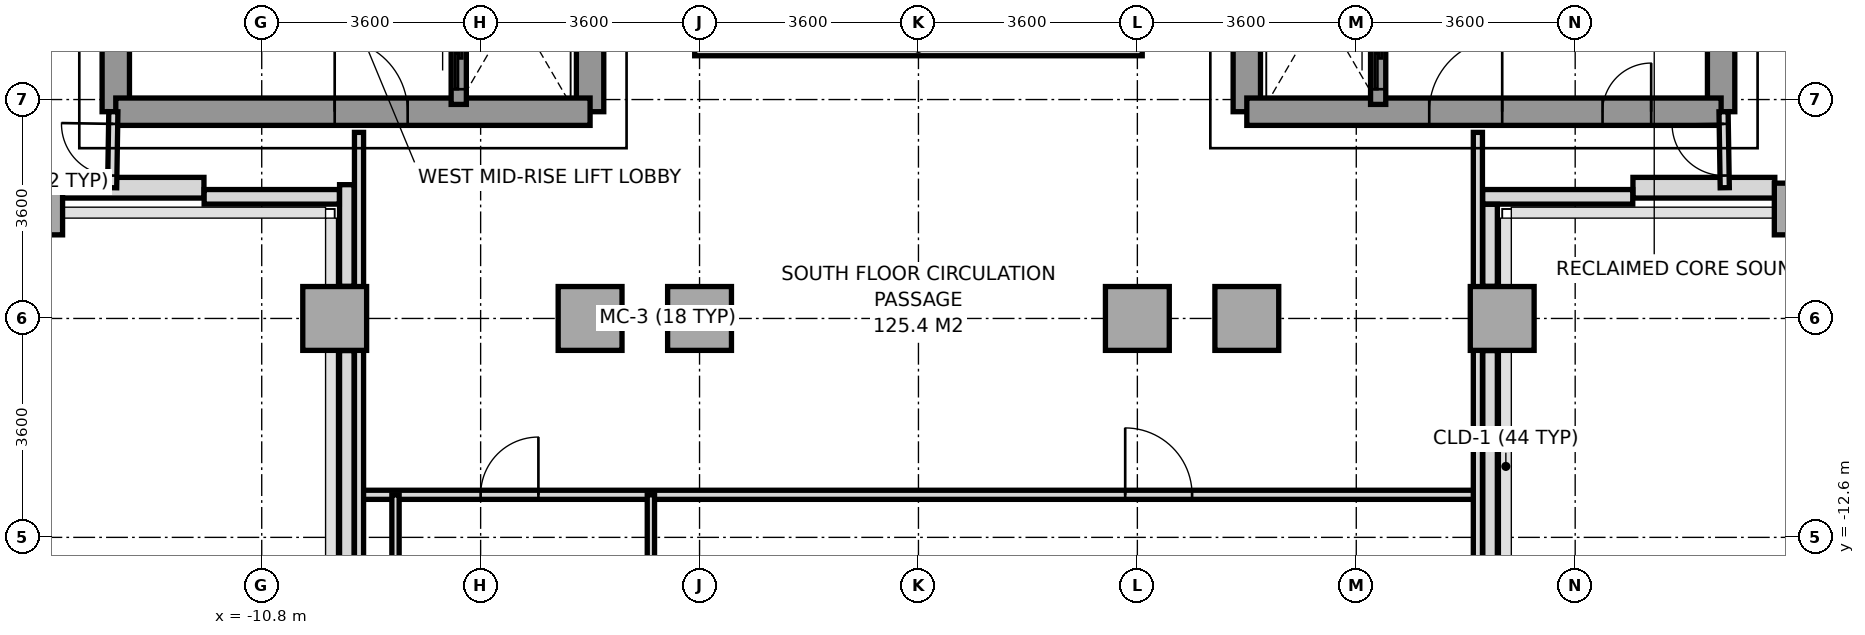
"""IFC4 building model, lengths in metres.
Left out: names, types, materials, properties, quantities, classifications, styles, units other than length and angle.
Written with IfcOpenShell. Run it as: python <this file> out.ifc"""

import sys

from ifc_helpers import new_model, si_unit, direction, frame, frame_2d, origin, origin_2d, place, context, subcontext, project, spatial, rectangle, extrude, source, transform, mapped, element, fill, save


model = new_model("IFC4")
c1 = context("Model", 3, precision=1e-05, world=origin(), true_north=direction((0.0, 1.0)))
c2 = subcontext(c1, "Body", "Model", "MODEL_VIEW")
j1 = project(units=[si_unit("LENGTHUNIT", "METRE"), si_unit("PLANEANGLEUNIT", "RADIAN")], contexts=[c1])
p1 = place(None, origin())
s1 = spatial("IfcSite", under=j1, at=p1, CompositionType="ELEMENT")
p2 = place(p1, origin())
s2 = spatial("IfcBuilding", under=s1, at=p2, CompositionType="ELEMENT")
p3 = place(p2, frame((0.0, 0.0, 138.0)))
s3 = spatial("IfcBuildingStorey", under=s2, at=p3, CompositionType="ELEMENT", Elevation=138.0)
m1 = source(origin(), c2, "Body", "SweptSolid", [
    extrude(rectangle(XDim=0.65, YDim=0.85, at=origin_2d()), origin(), (0.0, 0.0, 1.0), 3.2),
])
p4 = place(p3, frame((-14.4, -7.2, 0.0), z_axis=(0.0, 0.0, 1.0), x_axis=(1.0, 0.0, 0.0)))
e1 = element("IfcColumn", 1, at=p4, inside=s3, PredefinedType="COLUMN", context=c2, shape_type="MappedRepresentation", body=[
    mapped(m1, transform((0.0, 0.0, 0.0), x_axis=(1.0, 0.0, 0.0), y_axis=(0.0, 1.0, 0.0), z_axis=(0.0, 0.0, 1.0), scale=1.0)),
])
m2 = source(origin(), c2, "Body", "SweptSolid", [
    extrude(rectangle(XDim=1.05, YDim=1.05, at=origin_2d()), origin(), (0.0, 0.0, 1.0), 3.2),
])
for number, where, z_axis, x_axis in (
    (2, (-9.6, -9.0, 0.0), (0.0, 0.0, 1.0), (1.0, 0.0, 0.0)),
    (3, (-5.4, -9.0, 0.0), (0.0, 0.0, 1.0), (1.0, 0.0, 0.0)),
    (4, (-3.6, -9.0, 0.0), (0.0, 0.0, 1.0), (1.0, 0.0, 0.0)),
    (5, (3.6, -9.0, 0.0), (0.0, 0.0, 1.0), (1.0, 0.0, 0.0)),
    (6, (5.4, -9.0, 0.0), (0.0, 0.0, 1.0), (1.0, 0.0, 0.0)),
    (7, (9.6, -9.0, 0.0), (0.0, 0.0, 1.0), (1.0, 0.0, 0.0)),
):
    element("IfcColumn", number, at=place(p3, frame(where, z_axis=z_axis, x_axis=x_axis)), inside=s3, PredefinedType="COLUMN", context=c2, shape_type="MappedRepresentation", body=[
        mapped(m2, transform((0.0, 0.0, 0.0), x_axis=(1.0, 0.0, 0.0), y_axis=(0.0, 1.0, 0.0), z_axis=(0.0, 0.0, 1.0), scale=1.0)),
    ])
p5 = place(p3, frame((14.4, -7.2, 0.0), z_axis=(0.0, 0.0, 1.0), x_axis=(1.0, 0.0, 0.0)))
e8 = element("IfcColumn", 8, at=p5, inside=s3, PredefinedType="COLUMN", context=c2, shape_type="MappedRepresentation", body=[
    mapped(m1, transform((0.0, 0.0, 0.0), x_axis=(1.0, 0.0, 0.0), y_axis=(0.0, 1.0, 0.0), z_axis=(0.0, 0.0, 1.0), scale=1.0)),
])
for number, where, z_axis, x_axis in (
    (9, (-14.083, -6.85, 0.0), (0.0, 0.0, 1.0), (1.0, 0.0, 0.0)),
    (10, (11.75, -6.85, 0.0), (0.0, 0.0, 1.0), (1.0, 0.0, 0.0)),
):
    element("IfcWall", number, at=place(p3, frame(where, z_axis=z_axis, x_axis=x_axis)), inside=s3, PredefinedType="SOLIDWALL", context=c2, shape_type="SweptSolid", body=[
        extrude(rectangle(XDim=2.333, YDim=0.34, at=frame_2d((1.167, 0.0))), origin(), (0.0, 0.0, 1.0), 3.2),
    ])
p6 = place(p3, frame((11.747, -7.0, 0.0), z_axis=(0.0, 0.0, 1.0), x_axis=(-1.0, 0.0, 0.0)))
e11 = element("IfcWall", 11, at=p6, inside=s3, PredefinedType="PARAPET", context=c2, shape_type="SweptSolid", body=[
    extrude(rectangle(XDim=2.469, YDim=0.24, at=frame_2d((1.234, 0.0))), origin(), (0.0, 0.0, 1.0), 1.15),
])
p7 = place(p3, frame((9.4, -7.123, 0.0), z_axis=(0.0, 0.0, 1.0), x_axis=(0.0, -1.0, 0.0)))
e12 = element("IfcWall", 12, at=p7, inside=s3, PredefinedType="PARAPET", context=c2, shape_type="SweptSolid", body=[
    extrude(rectangle(XDim=1.349, YDim=0.24, at=frame_2d((0.674, 0.0))), origin(), (0.0, 0.0, 1.0), 1.15),
])
p8 = place(p3, frame((9.4, -9.528, 0.0), z_axis=(0.0, 0.0, 1.0), x_axis=(0.0, -1.0, 0.0)))
e13 = element("IfcWall", 13, at=p8, inside=s3, PredefinedType="PARAPET", context=c2, shape_type="SweptSolid", body=[
    extrude(rectangle(XDim=6.075, YDim=0.24, at=frame_2d((3.037, 0.0))), origin(), (0.0, 0.0, 1.0), 1.15),
])
p9 = place(p3, frame((-9.4, -15.358, 0.0), z_axis=(0.0, 0.0, 1.0), x_axis=(0.0, 1.0, 0.0)))
e14 = element("IfcWall", 14, at=p9, inside=s3, PredefinedType="PARAPET", context=c2, shape_type="SweptSolid", body=[
    extrude(rectangle(XDim=5.83, YDim=0.24, at=frame_2d((2.915, 0.0))), origin(), (0.0, 0.0, 1.0), 1.15),
])
p10 = place(p3, frame((-9.4, -8.472, 0.0), z_axis=(0.0, 0.0, 1.0), x_axis=(0.0, 1.0, 0.0)))
e15 = element("IfcWall", 15, at=p10, inside=s3, PredefinedType="PARAPET", context=c2, shape_type="SweptSolid", body=[
    extrude(rectangle(XDim=1.672, YDim=0.24, at=frame_2d((0.836, 0.0))), origin(), (0.0, 0.0, 1.0), 1.15),
])
p11 = place(p3, frame((-9.523, -7.0, 0.0), z_axis=(0.0, 0.0, 1.0), x_axis=(-1.0, 0.0, 0.0)))
e16 = element("IfcWall", 16, at=p11, inside=s3, PredefinedType="PARAPET", context=c2, shape_type="SweptSolid", body=[
    extrude(rectangle(XDim=2.224, YDim=0.24, at=frame_2d((1.112, 0.0))), origin(), (0.0, 0.0, 1.0), 1.15),
])
p12 = place(p3, frame((-13.2, -5.6, 0.0), z_axis=(0.0, 0.0, 1.0), x_axis=(0.0, 1.0, 0.0)))
e17 = element("IfcWall", 17, at=p12, inside=s3, PredefinedType="SHEAR", context=c2, shape_type="SweptSolid", body=[
    extrude(rectangle(XDim=11.2, YDim=0.45, at=frame_2d((5.6, 0.0))), origin(), (0.0, 0.0, 1.0), 3.2),
])
p13 = place(p3, frame((-5.4, -5.6, 0.0), z_axis=(0.0, 0.0, 1.0), x_axis=(0.0, 1.0, 0.0)))
e18 = element("IfcWall", 18, at=p13, inside=s3, PredefinedType="SHEAR", context=c2, shape_type="SweptSolid", body=[
    extrude(rectangle(XDim=12.5, YDim=0.45, at=frame_2d((6.25, 0.0))), origin(), (0.0, 0.0, 1.0), 3.2),
])
p14 = place(p13, frame((4.55, 0.0, 0.0)))
e19 = element("IfcOpeningElement", 19, at=p14, cuts=e18, PredefinedType="OPENING", context=c2, shape_type="SweptSolid", body=[
    extrude(rectangle(XDim=1.2, YDim=2.2, at=frame_2d((0.6, 1.1))), frame((0.0, 0.235, 0.0), z_axis=(0.0, -1.0, 0.0), x_axis=(1.0, 0.0, 0.0)), (0.0, 0.0, 1.0), 0.47),
])
p15 = place(p3, frame((-13.2, -5.6, 0.0), z_axis=(0.0, 0.0, 1.0), x_axis=(1.0, 0.0, 0.0)))
e20 = element("IfcWall", 20, at=p15, inside=s3, PredefinedType="SHEAR", context=c2, shape_type="SweptSolid", body=[
    extrude(rectangle(XDim=7.8, YDim=0.45, at=frame_2d((3.9, 0.0))), origin(), (0.0, 0.0, 1.0), 3.2),
])
p16 = place(p15, frame((3.6, 0.0, 0.0)))
e21 = element("IfcOpeningElement", 21, at=p16, cuts=e20, PredefinedType="OPENING", context=c2, shape_type="SweptSolid", body=[
    extrude(rectangle(XDim=1.2, YDim=2.2, at=frame_2d((0.6, 1.1))), frame((0.0, 0.235, 0.0), z_axis=(0.0, -1.0, 0.0), x_axis=(1.0, 0.0, 0.0)), (0.0, 0.0, 1.0), 0.47),
])
p17 = place(p3, frame((13.2, -5.6, 0.0), z_axis=(0.0, 0.0, 1.0), x_axis=(0.0, 1.0, 0.0)))
e22 = element("IfcWall", 22, at=p17, inside=s3, PredefinedType="SHEAR", context=c2, shape_type="SweptSolid", body=[
    extrude(rectangle(XDim=11.2, YDim=0.45, at=frame_2d((5.6, 0.0))), origin(), (0.0, 0.0, 1.0), 3.2),
])
p18 = place(p3, frame((5.4, -5.6, 0.0), z_axis=(0.0, 0.0, 1.0), x_axis=(0.0, 1.0, 0.0)))
e23 = element("IfcWall", 23, at=p18, inside=s3, PredefinedType="SHEAR", context=c2, shape_type="SweptSolid", body=[
    extrude(rectangle(XDim=12.5, YDim=0.45, at=frame_2d((6.25, 0.0))), origin(), (0.0, 0.0, 1.0), 3.2),
])
p19 = place(p18, frame((4.55, 0.0, 0.0)))
e24 = element("IfcOpeningElement", 24, at=p19, cuts=e23, PredefinedType="OPENING", context=c2, shape_type="SweptSolid", body=[
    extrude(rectangle(XDim=1.2, YDim=2.2, at=frame_2d((0.6, 1.1))), frame((0.0, 0.235, 0.0), z_axis=(0.0, -1.0, 0.0), x_axis=(1.0, 0.0, 0.0)), (0.0, 0.0, 1.0), 0.47),
])
p20 = place(p18, frame((7.88, 0.0, 0.0)))
e25 = element("IfcOpeningElement", 25, at=p20, cuts=e23, PredefinedType="OPENING", context=c2, shape_type="SweptSolid", body=[
    extrude(rectangle(XDim=0.8, YDim=2.1, at=frame_2d((0.4, 1.05))), frame((0.0, 0.235, 0.0), z_axis=(0.0, -1.0, 0.0), x_axis=(1.0, 0.0, 0.0)), (0.0, 0.0, 1.0), 0.47),
])
p21 = place(p3, frame((5.4, -5.6, 0.0), z_axis=(0.0, 0.0, 1.0), x_axis=(1.0, 0.0, 0.0)))
e26 = element("IfcWall", 26, at=p21, inside=s3, PredefinedType="SHEAR", context=c2, shape_type="SweptSolid", body=[
    extrude(rectangle(XDim=7.8, YDim=0.45, at=frame_2d((3.9, 0.0))), origin(), (0.0, 0.0, 1.0), 3.2),
])
p22 = place(p21, frame((3.0, 0.0, 0.0)))
e27 = element("IfcOpeningElement", 27, at=p22, cuts=e26, PredefinedType="OPENING", context=c2, shape_type="SweptSolid", body=[
    extrude(rectangle(XDim=1.2, YDim=2.2, at=frame_2d((0.6, 1.1))), frame((0.0, 0.235, 0.0), z_axis=(0.0, -1.0, 0.0), x_axis=(1.0, 0.0, 0.0)), (0.0, 0.0, 1.0), 0.47),
])
p23 = place(p21, frame((5.85, 0.0, 0.0)))
e28 = element("IfcOpeningElement", 28, at=p23, cuts=e26, PredefinedType="OPENING", context=c2, shape_type="SweptSolid", body=[
    extrude(rectangle(XDim=0.8, YDim=2.1, at=frame_2d((0.4, 1.05))), frame((0.0, 0.235, 0.0), z_axis=(0.0, -1.0, 0.0), x_axis=(1.0, 0.0, 0.0)), (0.0, 0.0, 1.0), 0.47),
])
p24 = place(p3, frame((-7.56, -5.48, 0.0), z_axis=(0.0, 0.0, 1.0), x_axis=(0.0, 1.0, 0.0)))
e29 = element("IfcWall", 29, at=p24, inside=s3, PredefinedType="SOLIDWALL", context=c2, shape_type="SweptSolid", body=[
    extrude(rectangle(XDim=1.6, YDim=0.25, at=frame_2d((0.8, 0.0))), origin(), (0.0, 0.0, 1.0), 3.2),
])
p25 = place(p24, frame((0.25, 0.0, 0.0)))
e30 = element("IfcOpeningElement", 30, at=p25, cuts=e29, PredefinedType="OPENING", context=c2, shape_type="SweptSolid", body=[
    extrude(rectangle(XDim=1.1, YDim=2.2, at=frame_2d((0.55, 1.1))), frame((0.0, 0.135, 0.0), z_axis=(0.0, -1.0, 0.0), x_axis=(1.0, 0.0, 0.0)), (0.0, 0.0, 1.0), 0.27),
])
p26 = place(p3, frame((7.56, -5.48, 0.0), z_axis=(0.0, 0.0, 1.0), x_axis=(0.0, 1.0, 0.0)))
e31 = element("IfcWall", 31, at=p26, inside=s3, PredefinedType="SOLIDWALL", context=c2, shape_type="SweptSolid", body=[
    extrude(rectangle(XDim=1.6, YDim=0.25, at=frame_2d((0.8, 0.0))), origin(), (0.0, 0.0, 1.0), 3.2),
])
p27 = place(p26, frame((0.25, 0.0, 0.0)))
e32 = element("IfcOpeningElement", 32, at=p27, cuts=e31, PredefinedType="OPENING", context=c2, shape_type="SweptSolid", body=[
    extrude(rectangle(XDim=1.1, YDim=2.2, at=frame_2d((0.55, 1.1))), frame((0.0, 0.135, 0.0), z_axis=(0.0, -1.0, 0.0), x_axis=(1.0, 0.0, 0.0)), (0.0, 0.0, 1.0), 0.27),
])
p28 = place(p3, frame((-9.2, -11.9, 0.0), z_axis=(0.0, 0.0, 1.0), x_axis=(1.0, 0.0, 0.0)))
e33 = element("IfcWall", 33, at=p28, inside=s3, PredefinedType="PARTITIONING", context=c2, shape_type="SweptSolid", body=[
    extrude(rectangle(XDim=18.4, YDim=0.15, at=frame_2d((9.2, 0.0))), origin(), (0.0, 0.0, 1.0), 3.2),
])
p29 = place(p28, frame((2.0, 0.0, 0.0)))
e34 = element("IfcOpeningElement", 34, at=p29, cuts=e33, PredefinedType="OPENING", context=c2, shape_type="SweptSolid", body=[
    extrude(rectangle(XDim=0.95, YDim=2.15, at=frame_2d((0.475, 1.075))), frame((0.0, 0.085, 0.0), z_axis=(0.0, -1.0, 0.0), x_axis=(1.0, 0.0, 0.0)), (0.0, 0.0, 1.0), 0.17),
])
p30 = place(p28, frame((12.6, 0.0, 0.0)))
e35 = element("IfcOpeningElement", 35, at=p30, cuts=e33, PredefinedType="OPENING", context=c2, shape_type="SweptSolid", body=[
    extrude(rectangle(XDim=1.1, YDim=2.2, at=frame_2d((0.55, 1.1))), frame((0.0, 0.085, 0.0), z_axis=(0.0, -1.0, 0.0), x_axis=(1.0, 0.0, 0.0)), (0.0, 0.0, 1.0), 0.17),
])
for number, where, z_axis, x_axis in (
    (36, (-9.2, -15.68, 0.0), (0.0, 0.0, 1.0), (0.0, 1.0, 0.0)),
    (37, (9.2, -15.68, 0.0), (0.0, 0.0, 1.0), (0.0, 1.0, 0.0)),
):
    element("IfcWall", number, at=place(p3, frame(where, z_axis=z_axis, x_axis=x_axis)), inside=s3, PredefinedType="PARTITIONING", context=c2, shape_type="SweptSolid", body=[
        extrude(rectangle(XDim=9.74, YDim=0.15, at=frame_2d((4.87, 0.0))), origin(), (0.0, 0.0, 1.0), 2.7),
    ])
p31 = place(p3, frame((-8.6, -15.5, 0.0), z_axis=(0.0, 0.0, 1.0), x_axis=(0.0, 1.0, 0.0)))
e38 = element("IfcWall", 38, at=p31, inside=s3, PredefinedType="PARTITIONING", context=c2, shape_type="SweptSolid", body=[
    extrude(rectangle(XDim=3.6, YDim=0.12, at=frame_2d((1.8, 0.0))), origin(), (0.0, 0.0, 1.0), 3.2),
])
p32 = place(p3, frame((-4.4, -15.5, 0.0), z_axis=(0.0, 0.0, 1.0), x_axis=(0.0, 1.0, 0.0)))
e39 = element("IfcWall", 39, at=p32, inside=s3, PredefinedType="PARTITIONING", context=c2, shape_type="SweptSolid", body=[
    extrude(rectangle(XDim=3.6, YDim=0.12, at=frame_2d((1.8, 0.0))), origin(), (0.0, 0.0, 1.0), 2.7),
])
p33 = place(p3, frame((-13.26, -6.85, 0.0), z_axis=(0.0, 0.0, 1.0), x_axis=(0.016013571389, 0.999871774545, 0.0)))
e40 = element("IfcWall", 40, at=p33, inside=s3, PredefinedType="PARTITIONING", context=c2, shape_type="SweptSolid", body=[
    extrude(rectangle(XDim=1.25, YDim=0.15, at=frame_2d((0.625, 0.0))), origin(), (0.0, 0.0, 1.0), 3.2),
])
p34 = place(p33, frame((0.2, 0.0, 0.0)))
e41 = element("IfcOpeningElement", 41, at=p34, cuts=e40, PredefinedType="OPENING", context=c2, shape_type="SweptSolid", body=[
    extrude(rectangle(XDim=0.85, YDim=2.1, at=frame_2d((0.425, 1.05))), frame((0.0, 0.085, 0.0), z_axis=(0.0, -1.0, 0.0), x_axis=(1.0, 0.0, 0.0)), (0.0, 0.0, 1.0), 0.17),
])
p35 = place(p3, frame((13.26, -6.85, 0.0), z_axis=(0.0, 0.0, 1.0), x_axis=(-0.016013571389, 0.999871774545, 0.0)))
e42 = element("IfcWall", 42, at=p35, inside=s3, PredefinedType="PARTITIONING", context=c2, shape_type="SweptSolid", body=[
    extrude(rectangle(XDim=1.25, YDim=0.15, at=frame_2d((0.625, 0.0))), origin(), (0.0, 0.0, 1.0), 3.2),
])
p36 = place(p35, frame((0.2, 0.0, 0.0)))
e43 = element("IfcOpeningElement", 43, at=p36, cuts=e42, PredefinedType="OPENING", context=c2, shape_type="SweptSolid", body=[
    extrude(rectangle(XDim=0.85, YDim=2.1, at=frame_2d((0.425, 1.05))), frame((0.0, 0.085, 0.0), z_axis=(0.0, -1.0, 0.0), x_axis=(1.0, 0.0, 0.0)), (0.0, 0.0, 1.0), 0.17),
])
p37 = place(p3, frame((-3.68, -4.56, 0.0), z_axis=(0.0, 0.0, 1.0), x_axis=(1.0, 0.0, 0.0)))
e44 = element("IfcWall", 44, at=p37, inside=s3, PredefinedType="PARAPET", context=c2, shape_type="SweptSolid", body=[
    extrude(rectangle(XDim=7.36, YDim=0.24, at=frame_2d((3.68, 0.0))), origin(), (0.0, 0.0, 1.0), 1.15),
])
m3 = source(origin(), c2, "Body", "SweptSolid", [
    extrude(rectangle(XDim=1.2, YDim=2.2, at=frame_2d((0.6, 1.1))), frame((0.0, 0.025, 0.0), z_axis=(0.0, -1.0, 0.0), x_axis=(1.0, 0.0, 0.0)), (0.0, 0.0, 1.0), 0.05),
])
p38 = place(p16, origin())
e45 = element("IfcDoor", 45, at=p38, inside=s3, OperationType="SINGLE_SWING_LEFT", PredefinedType="DOOR", context=c2, shape_type="MappedRepresentation", body=[
    mapped(m3, transform((0.0, 0.0, 0.0), x_axis=(1.0, 0.0, 0.0), y_axis=(0.0, 1.0, 0.0), z_axis=(0.0, 0.0, 1.0), scale=1.0)),
])
fill(e21, e45)
p39 = place(p22, origin())
e46 = element("IfcDoor", 46, at=p39, inside=s3, OperationType="SINGLE_SWING_RIGHT", PredefinedType="DOOR", context=c2, shape_type="MappedRepresentation", body=[
    mapped(m3, transform((0.0, 0.0, 0.0), x_axis=(1.0, 0.0, 0.0), y_axis=(0.0, 1.0, 0.0), z_axis=(0.0, 0.0, 1.0), scale=1.0)),
])
fill(e27, e46)
m4 = source(origin(), c2, "Body", "SweptSolid", [
    extrude(rectangle(XDim=0.8, YDim=2.1, at=frame_2d((0.4, 1.05))), frame((0.0, 0.025, 0.0), z_axis=(0.0, -1.0, 0.0), x_axis=(1.0, 0.0, 0.0)), (0.0, 0.0, 1.0), 0.05),
])
p40 = place(p23, origin())
e47 = element("IfcDoor", 47, at=p40, inside=s3, OperationType="SINGLE_SWING_RIGHT", PredefinedType="DOOR", context=c2, shape_type="MappedRepresentation", body=[
    mapped(m4, transform((0.0, 0.0, 0.0), x_axis=(1.0, 0.0, 0.0), y_axis=(0.0, 1.0, 0.0), z_axis=(0.0, 0.0, 1.0), scale=1.0)),
])
fill(e28, e47)
m5 = source(origin(), c2, "Body", "SweptSolid", [
    extrude(rectangle(XDim=1.1, YDim=2.2, at=frame_2d((0.55, 1.1))), frame((0.0, 0.025, 0.0), z_axis=(0.0, -1.0, 0.0), x_axis=(1.0, 0.0, 0.0)), (0.0, 0.0, 1.0), 0.05),
])
p41 = place(p25, origin())
e48 = element("IfcDoor", 48, at=p41, inside=s3, OperationType="SLIDING_TO_LEFT", PredefinedType="DOOR", context=c2, shape_type="MappedRepresentation", body=[
    mapped(m5, transform((0.0, 0.0, 0.0), x_axis=(1.0, 0.0, 0.0), y_axis=(0.0, 1.0, 0.0), z_axis=(0.0, 0.0, 1.0), scale=1.0)),
])
fill(e30, e48)
p42 = place(p27, origin())
e49 = element("IfcDoor", 49, at=p42, inside=s3, OperationType="SLIDING_TO_LEFT", PredefinedType="DOOR", context=c2, shape_type="MappedRepresentation", body=[
    mapped(m5, transform((0.0, 0.0, 0.0), x_axis=(1.0, 0.0, 0.0), y_axis=(0.0, 1.0, 0.0), z_axis=(0.0, 0.0, 1.0), scale=1.0)),
])
fill(e32, e49)
m6 = source(origin(), c2, "Body", "SweptSolid", [
    extrude(rectangle(XDim=0.95, YDim=2.15, at=frame_2d((0.475, 1.075))), frame((0.0, 0.025, 0.0), z_axis=(0.0, -1.0, 0.0), x_axis=(1.0, 0.0, 0.0)), (0.0, 0.0, 1.0), 0.05),
])
p43 = place(p29, origin())
e50 = element("IfcDoor", 50, at=p43, inside=s3, OperationType="SINGLE_SWING_RIGHT", PredefinedType="DOOR", context=c2, shape_type="MappedRepresentation", body=[
    mapped(m6, transform((0.0, 0.0, 0.0), x_axis=(1.0, 0.0, 0.0), y_axis=(0.0, 1.0, 0.0), z_axis=(0.0, 0.0, 1.0), scale=1.0)),
])
fill(e34, e50)
p44 = place(p30, origin())
e51 = element("IfcDoor", 51, at=p44, inside=s3, OperationType="SINGLE_SWING_LEFT", PredefinedType="DOOR", context=c2, shape_type="MappedRepresentation", body=[
    mapped(m5, transform((0.0, 0.0, 0.0), x_axis=(1.0, 0.0, 0.0), y_axis=(0.0, 1.0, 0.0), z_axis=(0.0, 0.0, 1.0), scale=1.0)),
])
fill(e35, e51)
m7 = source(origin(), c2, "Body", "SweptSolid", [
    extrude(rectangle(XDim=0.85, YDim=2.1, at=frame_2d((0.425, 1.05))), frame((0.0, 0.025, 0.0), z_axis=(0.0, -1.0, 0.0), x_axis=(1.0, 0.0, 0.0)), (0.0, 0.0, 1.0), 0.05),
])
p45 = place(p34, origin())
e52 = element("IfcDoor", 52, at=p45, inside=s3, OperationType="SINGLE_SWING_RIGHT", PredefinedType="DOOR", context=c2, shape_type="MappedRepresentation", body=[
    mapped(m7, transform((0.0, 0.0, 0.0), x_axis=(1.0, 0.0, 0.0), y_axis=(0.0, 1.0, 0.0), z_axis=(0.0, 0.0, 1.0), scale=1.0)),
])
fill(e41, e52)
p46 = place(p36, origin())
e53 = element("IfcDoor", 53, at=p46, inside=s3, OperationType="SINGLE_SWING_RIGHT", PredefinedType="DOOR", context=c2, shape_type="MappedRepresentation", body=[
    mapped(m7, transform((0.0, 0.0, 0.0), x_axis=(1.0, 0.0, 0.0), y_axis=(0.0, 1.0, 0.0), z_axis=(0.0, 0.0, 1.0), scale=1.0)),
])
fill(e43, e53)
save(model, sys.argv[1])
